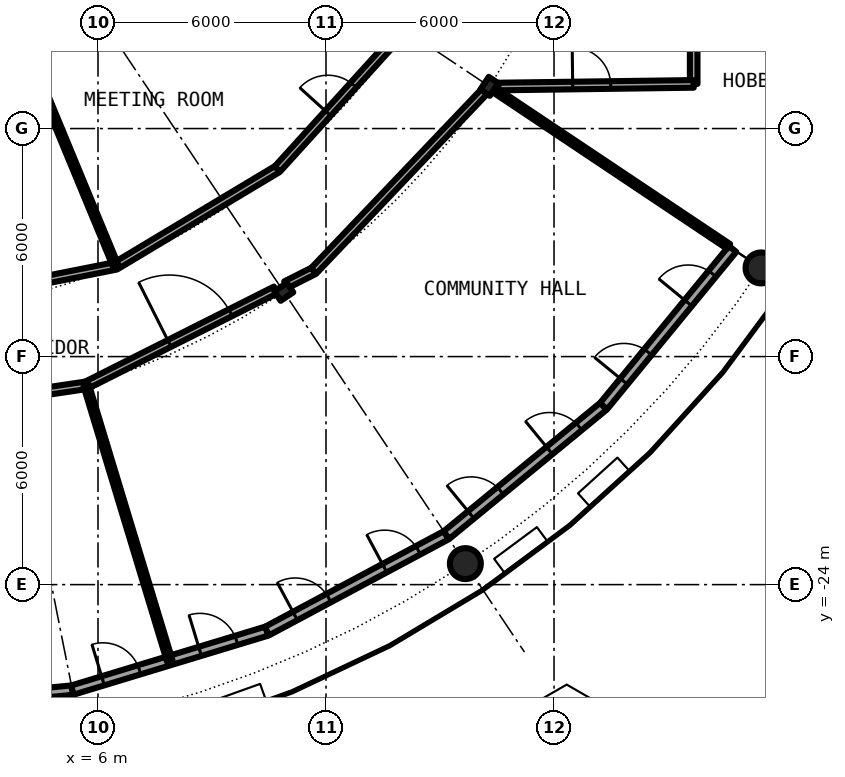
"""IFC4 building model, lengths in metres.
Left out: names, types, materials, properties, quantities, classifications, styles, units other than length and angle.
Written with IfcOpenShell. Run it as: python <this file> out.ifc"""

import sys

from ifc_helpers import new_model, si_unit, direction, frame, frame_2d, origin, origin_2d, place, context, subcontext, project, spatial, rectangle, hollow_circle, i_section, extrude, element, fill, save


model = new_model("IFC4")
c1 = context("Model", 3, precision=1e-05, world=origin(), true_north=direction((0.0, 1.0)))
c2 = subcontext(c1, "Body", "Model", "MODEL_VIEW")
j1 = project(units=[si_unit("LENGTHUNIT", "METRE"), si_unit("PLANEANGLEUNIT", "RADIAN")], contexts=[c1])
p1 = place(None, origin())
s1 = spatial("IfcSite", under=j1, at=p1, CompositionType="ELEMENT")
p2 = place(p1, origin())
s2 = spatial("IfcBuilding", under=s1, at=p2, CompositionType="ELEMENT")
p3 = place(p2, frame((0.0, 0.0, 208.5)))
s3 = spatial("IfcBuildingStorey", under=s2, at=p3, CompositionType="ELEMENT", Elevation=208.5)
for number, where, z_axis, x_axis in (
    (1, (15.667, -23.448, 0.0), (0.0, 0.0, 1.0), (1.0, 0.0, 0.0)),
    (2, (23.448, -15.667, 0.0), (0.0, 0.0, 1.0), (1.0, 0.0, 0.0)),
):
    element("IfcColumn", number, at=place(p3, frame(where, z_axis=z_axis, x_axis=x_axis)), inside=s3, PredefinedType="COLUMN", context=c2, shape_type="SweptSolid", body=[
        extrude(hollow_circle(Radius=0.406, WallThickness=0.03, at=origin_2d()), origin(), (0.0, 0.0, 1.0), 4.2),
    ])
for number, where, z_axis, x_axis in (
    (3, (10.889, -16.297, 0.0), (0.0, 0.0, 1.0), (0.556, -0.831, 0.0)),
    (4, (16.297, -10.889, 0.0), (0.0, 0.0, 1.0), (0.831, -0.556, 0.0)),
):
    element("IfcColumn", number, at=place(p3, frame(where, z_axis=z_axis, x_axis=x_axis)), inside=s3, PredefinedType="COLUMN", context=c2, shape_type="SweptSolid", body=[
        extrude(i_section(OverallWidth=0.3, OverallDepth=0.4, WebThickness=0.013, FlangeThickness=0.024, FilletRadius=0.027, at=origin_2d()), origin(), (0.0, 0.0, 1.0), 4.2),
    ])
p4 = place(p3, frame((0.0, -27.3, 0.0), z_axis=(0.0, 0.0, 1.0), x_axis=(0.995173996315, 0.098126026407, 0.0)))
e5 = element("IfcWall", 5, at=p4, inside=s3, PredefinedType="SOLIDWALL", context=c2, shape_type="SweptSolid", body=[
    extrude(rectangle(XDim=5.352, YDim=0.25, at=frame_2d((2.676, 0.0))), origin(), (0.0, 0.0, 1.0), 3.85),
])
p5 = place(p4, frame((0.841, 0.0, 0.0)))
e6 = element("IfcOpeningElement", 6, at=p5, cuts=e5, PredefinedType="OPENING", context=c2, shape_type="SweptSolid", body=[
    extrude(rectangle(XDim=1.0, YDim=2.2, at=frame_2d((0.5, 1.1))), frame((0.0, 0.135, 0.0), z_axis=(0.0, -1.0, 0.0), x_axis=(1.0, 0.0, 0.0)), (0.0, 0.0, 1.0), 0.27),
])
p6 = place(p4, frame((3.51, 0.0, 0.0)))
e7 = element("IfcOpeningElement", 7, at=p6, cuts=e5, PredefinedType="OPENING", context=c2, shape_type="SweptSolid", body=[
    extrude(rectangle(XDim=1.0, YDim=2.2, at=frame_2d((0.5, 1.1))), frame((0.0, 0.135, 0.0), z_axis=(0.0, -1.0, 0.0), x_axis=(1.0, 0.0, 0.0)), (0.0, 0.0, 1.0), 0.27),
])
p7 = place(p3, frame((5.326, -26.775, 0.0), z_axis=(0.0, 0.0, 1.0), x_axis=(0.956965678721, 0.290201119486, 0.0)))
e8 = element("IfcWall", 8, at=p7, inside=s3, PredefinedType="SOLIDWALL", context=c2, shape_type="SweptSolid", body=[
    extrude(rectangle(XDim=5.351, YDim=0.25, at=frame_2d((2.676, 0.0))), origin(), (0.0, 0.0, 1.0), 3.85),
])
p8 = place(p7, frame((0.841, 0.0, 0.0)))
e9 = element("IfcOpeningElement", 9, at=p8, cuts=e8, PredefinedType="OPENING", context=c2, shape_type="SweptSolid", body=[
    extrude(rectangle(XDim=1.0, YDim=2.2, at=frame_2d((0.5, 1.1))), frame((0.0, 0.135, 0.0), z_axis=(0.0, -1.0, 0.0), x_axis=(1.0, 0.0, 0.0)), (0.0, 0.0, 1.0), 0.27),
])
p9 = place(p7, frame((3.51, 0.0, 0.0)))
e10 = element("IfcOpeningElement", 10, at=p9, cuts=e8, PredefinedType="OPENING", context=c2, shape_type="SweptSolid", body=[
    extrude(rectangle(XDim=1.0, YDim=2.2, at=frame_2d((0.5, 1.1))), frame((0.0, 0.135, 0.0), z_axis=(0.0, -1.0, 0.0), x_axis=(1.0, 0.0, 0.0)), (0.0, 0.0, 1.0), 0.27),
])
p10 = place(p3, frame((10.447, -25.222, 0.0), z_axis=(0.0, 0.0, 1.0), x_axis=(0.881915646801, 0.471407246368, 0.0)))
e11 = element("IfcWall", 11, at=p10, inside=s3, PredefinedType="SOLIDWALL", context=c2, shape_type="SweptSolid", body=[
    extrude(rectangle(XDim=5.352, YDim=0.25, at=frame_2d((2.676, 0.0))), origin(), (0.0, 0.0, 1.0), 3.85),
])
p11 = place(p10, frame((0.841, 0.0, 0.0)))
e12 = element("IfcOpeningElement", 12, at=p11, cuts=e11, PredefinedType="OPENING", context=c2, shape_type="SweptSolid", body=[
    extrude(rectangle(XDim=1.0, YDim=2.2, at=frame_2d((0.5, 1.1))), frame((0.0, 0.135, 0.0), z_axis=(0.0, -1.0, 0.0), x_axis=(1.0, 0.0, 0.0)), (0.0, 0.0, 1.0), 0.27),
])
p12 = place(p10, frame((3.51, 0.0, 0.0)))
e13 = element("IfcOpeningElement", 13, at=p12, cuts=e11, PredefinedType="OPENING", context=c2, shape_type="SweptSolid", body=[
    extrude(rectangle(XDim=1.0, YDim=2.2, at=frame_2d((0.5, 1.1))), frame((0.0, 0.135, 0.0), z_axis=(0.0, -1.0, 0.0), x_axis=(1.0, 0.0, 0.0)), (0.0, 0.0, 1.0), 0.27),
])
p13 = place(p3, frame((15.167, -22.699, 0.0), z_axis=(0.0, 0.0, 1.0), x_axis=(0.773019449054, 0.634382322723, 0.0)))
e14 = element("IfcWall", 14, at=p13, inside=s3, PredefinedType="SOLIDWALL", context=c2, shape_type="SweptSolid", body=[
    extrude(rectangle(XDim=5.352, YDim=0.25, at=frame_2d((2.676, 0.0))), origin(), (0.0, 0.0, 1.0), 3.85),
])
p14 = place(p13, frame((0.841, 0.0, 0.0)))
e15 = element("IfcOpeningElement", 15, at=p14, cuts=e14, PredefinedType="OPENING", context=c2, shape_type="SweptSolid", body=[
    extrude(rectangle(XDim=1.0, YDim=2.2, at=frame_2d((0.5, 1.1))), frame((0.0, 0.135, 0.0), z_axis=(0.0, -1.0, 0.0), x_axis=(1.0, 0.0, 0.0)), (0.0, 0.0, 1.0), 0.27),
])
p15 = place(p13, frame((3.51, 0.0, 0.0)))
e16 = element("IfcOpeningElement", 16, at=p15, cuts=e14, PredefinedType="OPENING", context=c2, shape_type="SweptSolid", body=[
    extrude(rectangle(XDim=1.0, YDim=2.2, at=frame_2d((0.5, 1.1))), frame((0.0, 0.135, 0.0), z_axis=(0.0, -1.0, 0.0), x_axis=(1.0, 0.0, 0.0)), (0.0, 0.0, 1.0), 0.27),
])
p16 = place(p3, frame((19.304, -19.304, 0.0), z_axis=(0.0, 0.0, 1.0), x_axis=(0.634382322723, 0.773019449054, 0.0)))
e17 = element("IfcWall", 17, at=p16, inside=s3, PredefinedType="SOLIDWALL", context=c2, shape_type="SweptSolid", body=[
    extrude(rectangle(XDim=5.352, YDim=0.25, at=frame_2d((2.676, 0.0))), origin(), (0.0, 0.0, 1.0), 3.85),
])
p17 = place(p16, frame((0.841, 0.0, 0.0)))
e18 = element("IfcOpeningElement", 18, at=p17, cuts=e17, PredefinedType="OPENING", context=c2, shape_type="SweptSolid", body=[
    extrude(rectangle(XDim=1.0, YDim=2.2, at=frame_2d((0.5, 1.1))), frame((0.0, 0.135, 0.0), z_axis=(0.0, -1.0, 0.0), x_axis=(1.0, 0.0, 0.0)), (0.0, 0.0, 1.0), 0.27),
])
p18 = place(p16, frame((3.51, 0.0, 0.0)))
e19 = element("IfcOpeningElement", 19, at=p18, cuts=e17, PredefinedType="OPENING", context=c2, shape_type="SweptSolid", body=[
    extrude(rectangle(XDim=1.0, YDim=2.2, at=frame_2d((0.5, 1.1))), frame((0.0, 0.135, 0.0), z_axis=(0.0, -1.0, 0.0), x_axis=(1.0, 0.0, 0.0)), (0.0, 0.0, 1.0), 0.27),
])
p19 = place(p3, frame((21.675, -10.825, 0.0), z_axis=(0.0, 0.0, 1.0), x_axis=(0.0, 1.0, 0.0)))
e20 = element("IfcWall", 20, at=p19, inside=s3, PredefinedType="PARTITIONING", context=c2, shape_type="SweptSolid", body=[
    extrude(rectangle(XDim=1.775, YDim=0.2, at=frame_2d((0.887, 0.0))), origin(), (0.0, 0.0, 1.0), 3.85),
])
p20 = place(p3, frame((3.936, -19.016, 0.0), z_axis=(0.0, 0.0, 1.0), x_axis=(0.989189411235, 0.1466434748, 0.0)))
e21 = element("IfcWall", 21, at=p20, inside=s3, PredefinedType="PARTITIONING", context=c2, shape_type="SweptSolid", body=[
    extrude(rectangle(XDim=1.773, YDim=0.2, at=frame_2d((0.887, 0.0))), origin(), (0.0, 0.0, 1.0), 3.6),
])
p21 = place(p3, frame((5.69, -18.756, 0.0), z_axis=(0.0, 0.0, 1.0), x_axis=(0.893242938285, 0.449574302206, 0.0)))
e22 = element("IfcWall", 22, at=p21, inside=s3, PredefinedType="PARTITIONING", context=c2, shape_type="SweptSolid", body=[
    extrude(rectangle(XDim=5.581, YDim=0.2, at=frame_2d((2.791, 0.0))), origin(), (0.0, 0.0, 1.0), 3.6),
])
p22 = place(p21, frame((2.451, 0.0, 0.0)))
e23 = element("IfcOpeningElement", 23, at=p22, cuts=e22, PredefinedType="OPENING", context=c2, shape_type="SweptSolid", body=[
    extrude(rectangle(XDim=1.8, YDim=2.3, at=frame_2d((0.9, 1.15))), frame((0.0, 0.11, 0.0), z_axis=(0.0, -1.0, 0.0), x_axis=(1.0, 0.0, 0.0)), (0.0, 0.0, 1.0), 0.22),
])
p23 = place(p3, frame((10.945, -16.111, 0.0), z_axis=(0.0, 0.0, 1.0), x_axis=(0.893110817984, 0.449836711263, 0.0)))
e24 = element("IfcWall", 24, at=p23, inside=s3, PredefinedType="PARTITIONING", context=c2, shape_type="SweptSolid", body=[
    extrude(rectangle(XDim=0.818, YDim=0.2, at=frame_2d((0.409, 0.0))), origin(), (0.0, 0.0, 1.0), 3.85),
])
p24 = place(p3, frame((11.676, -15.743, 0.0), z_axis=(0.0, 0.0, 1.0), x_axis=(0.689484820725, 0.724300132535, 0.0)))
e25 = element("IfcWall", 25, at=p24, inside=s3, PredefinedType="PARTITIONING", context=c2, shape_type="SweptSolid", body=[
    extrude(rectangle(XDim=6.55, YDim=0.2, at=frame_2d((3.275, 0.0))), origin(), (0.0, 0.0, 1.0), 3.6),
])
p25 = place(p3, frame((6.467, -15.614, 0.0), z_axis=(0.0, 0.0, 1.0), x_axis=(0.857696997328, 0.514155483074, 0.0)))
e26 = element("IfcWall", 26, at=p25, inside=s3, PredefinedType="PARTITIONING", context=c2, shape_type="SweptSolid", body=[
    extrude(rectangle(XDim=4.96, YDim=0.2, at=frame_2d((2.48, 0.0))), origin(), (0.0, 0.0, 1.0), 3.85),
])
p26 = place(p3, frame((10.721, -13.064, 0.0), z_axis=(0.0, 0.0, 1.0), x_axis=(0.671634030197, 0.740883074095, 0.0)))
e27 = element("IfcWall", 27, at=p26, inside=s3, PredefinedType="PARTITIONING", context=c2, shape_type="SweptSolid", body=[
    extrude(rectangle(XDim=5.08, YDim=0.2, at=frame_2d((2.54, 0.0))), origin(), (0.0, 0.0, 1.0), 3.85),
])
p27 = place(p26, frame((1.98, 0.0, 0.0)))
e28 = element("IfcOpeningElement", 28, at=p27, cuts=e27, PredefinedType="OPENING", context=c2, shape_type="SweptSolid", body=[
    extrude(rectangle(XDim=1.0, YDim=2.3, at=frame_2d((0.5, 1.15))), frame((0.0, 0.11, 0.0), z_axis=(0.0, -1.0, 0.0), x_axis=(1.0, 0.0, 0.0)), (0.0, 0.0, 1.0), 0.22),
])
p28 = place(p3, frame((0.0, -16.9, 0.0), z_axis=(0.0, 0.0, 1.0), x_axis=(0.980799374359, 0.195019453537, 0.0)))
e29 = element("IfcWall", 29, at=p28, inside=s3, PredefinedType="PARTITIONING", context=c2, shape_type="SweptSolid", body=[
    extrude(rectangle(XDim=6.594, YDim=0.2, at=frame_2d((3.297, 0.0))), origin(), (0.0, 0.0, 1.0), 3.85),
])
p29 = place(p28, frame((2.797, 0.0, 0.0)))
e30 = element("IfcOpeningElement", 30, at=p29, cuts=e29, PredefinedType="OPENING", context=c2, shape_type="SweptSolid", body=[
    extrude(rectangle(XDim=1.0, YDim=2.3, at=frame_2d((0.5, 1.15))), frame((0.0, 0.11, 0.0), z_axis=(0.0, -1.0, 0.0), x_axis=(1.0, 0.0, 0.0)), (0.0, 0.0, 1.0), 0.22),
])
p30 = place(p3, frame((16.534, -10.894, 0.0), z_axis=(0.0, 0.0, 1.0), x_axis=(0.999909707888, 0.013437859594, 0.0)))
e31 = element("IfcWall", 31, at=p30, inside=s3, PredefinedType="PARTITIONING", context=c2, shape_type="SweptSolid", body=[
    extrude(rectangle(XDim=5.142, YDim=0.2, at=frame_2d((2.571, 0.0))), origin(), (0.0, 0.0, 1.0), 3.85),
])
p31 = place(p30, frame((1.958, 0.0, 0.0)))
e32 = element("IfcOpeningElement", 32, at=p31, cuts=e31, PredefinedType="OPENING", context=c2, shape_type="SweptSolid", body=[
    extrude(rectangle(XDim=1.0, YDim=2.3, at=frame_2d((0.5, 1.15))), frame((0.0, 0.11, 0.0), z_axis=(0.0, -1.0, 0.0), x_axis=(1.0, 0.0, 0.0)), (0.0, 0.0, 1.0), 0.22),
])
p32 = place(p3, frame((2.954, -7.132, 0.0), z_axis=(0.0, 0.0, 1.0), x_axis=(0.382646942224, -0.923894646378, 0.0)))
e33 = element("IfcWall", 33, at=p32, inside=s3, PredefinedType="PARTITIONING", context=c2, shape_type="SweptSolid", body=[
    extrude(rectangle(XDim=9.181, YDim=0.15, at=frame_2d((4.59, 0.0))), origin(), (0.0, 0.0, 1.0), 3.85),
])
p33 = place(p3, frame((5.69, -18.756, 0.0), z_axis=(0.0, 0.0, 1.0), x_axis=(0.29017646164, -0.956973155898, 0.0)))
e34 = element("IfcWall", 34, at=p33, inside=s3, PredefinedType="PARTITIONING", context=c2, shape_type="SweptSolid", body=[
    extrude(rectangle(XDim=7.575, YDim=0.15, at=frame_2d((3.787, 0.0))), origin(), (0.0, 0.0, 1.0), 3.85),
])
p34 = place(p3, frame((16.461, -11.003, 0.0), z_axis=(0.0, 0.0, 1.0), x_axis=(0.831418274402, -0.555647057933, 0.0)))
e35 = element("IfcWall", 35, at=p34, inside=s3, PredefinedType="PARTITIONING", context=c2, shape_type="SweptSolid", body=[
    extrude(rectangle(XDim=7.375, YDim=0.15, at=frame_2d((3.688, 0.0))), origin(), (0.0, 0.0, 1.0), 3.85),
])
p35 = place(p8, origin())
e36 = element("IfcDoor", 36, at=p35, inside=s3, OperationType="SINGLE_SWING_LEFT", PredefinedType="DOOR", context=c2, shape_type="SweptSolid", body=[
    extrude(rectangle(XDim=1.0, YDim=2.2, at=frame_2d((0.5, 1.1))), frame((0.0, 0.025, 0.0), z_axis=(0.0, -1.0, 0.0), x_axis=(1.0, 0.0, 0.0)), (0.0, 0.0, 1.0), 0.05),
])
fill(e9, e36)
p36 = place(p9, origin())
e37 = element("IfcDoor", 37, at=p36, inside=s3, OperationType="SINGLE_SWING_LEFT", PredefinedType="DOOR", context=c2, shape_type="SweptSolid", body=[
    extrude(rectangle(XDim=1.0, YDim=2.2, at=frame_2d((0.5, 1.1))), frame((0.0, 0.025, 0.0), z_axis=(0.0, -1.0, 0.0), x_axis=(1.0, 0.0, 0.0)), (0.0, 0.0, 1.0), 0.05),
])
fill(e10, e37)
p37 = place(p11, origin())
e38 = element("IfcDoor", 38, at=p37, inside=s3, OperationType="SINGLE_SWING_LEFT", PredefinedType="DOOR", context=c2, shape_type="SweptSolid", body=[
    extrude(rectangle(XDim=1.0, YDim=2.2, at=frame_2d((0.5, 1.1))), frame((0.0, 0.025, 0.0), z_axis=(0.0, -1.0, 0.0), x_axis=(1.0, 0.0, 0.0)), (0.0, 0.0, 1.0), 0.05),
])
fill(e12, e38)
p38 = place(p12, origin())
e39 = element("IfcDoor", 39, at=p38, inside=s3, OperationType="SINGLE_SWING_LEFT", PredefinedType="DOOR", context=c2, shape_type="SweptSolid", body=[
    extrude(rectangle(XDim=1.0, YDim=2.2, at=frame_2d((0.5, 1.1))), frame((0.0, 0.025, 0.0), z_axis=(0.0, -1.0, 0.0), x_axis=(1.0, 0.0, 0.0)), (0.0, 0.0, 1.0), 0.05),
])
fill(e13, e39)
p39 = place(p14, origin())
e40 = element("IfcDoor", 40, at=p39, inside=s3, OperationType="SINGLE_SWING_LEFT", PredefinedType="DOOR", context=c2, shape_type="SweptSolid", body=[
    extrude(rectangle(XDim=1.0, YDim=2.2, at=frame_2d((0.5, 1.1))), frame((0.0, 0.025, 0.0), z_axis=(0.0, -1.0, 0.0), x_axis=(1.0, 0.0, 0.0)), (0.0, 0.0, 1.0), 0.05),
])
fill(e15, e40)
p40 = place(p15, origin())
e41 = element("IfcDoor", 41, at=p40, inside=s3, OperationType="SINGLE_SWING_LEFT", PredefinedType="DOOR", context=c2, shape_type="SweptSolid", body=[
    extrude(rectangle(XDim=1.0, YDim=2.2, at=frame_2d((0.5, 1.1))), frame((0.0, 0.025, 0.0), z_axis=(0.0, -1.0, 0.0), x_axis=(1.0, 0.0, 0.0)), (0.0, 0.0, 1.0), 0.05),
])
fill(e16, e41)
p41 = place(p17, origin())
e42 = element("IfcDoor", 42, at=p41, inside=s3, OperationType="SINGLE_SWING_LEFT", PredefinedType="DOOR", context=c2, shape_type="SweptSolid", body=[
    extrude(rectangle(XDim=1.0, YDim=2.2, at=frame_2d((0.5, 1.1))), frame((0.0, 0.025, 0.0), z_axis=(0.0, -1.0, 0.0), x_axis=(1.0, 0.0, 0.0)), (0.0, 0.0, 1.0), 0.05),
])
fill(e18, e42)
p42 = place(p18, origin())
e43 = element("IfcDoor", 43, at=p42, inside=s3, OperationType="SINGLE_SWING_LEFT", PredefinedType="DOOR", context=c2, shape_type="SweptSolid", body=[
    extrude(rectangle(XDim=1.0, YDim=2.2, at=frame_2d((0.5, 1.1))), frame((0.0, 0.025, 0.0), z_axis=(0.0, -1.0, 0.0), x_axis=(1.0, 0.0, 0.0)), (0.0, 0.0, 1.0), 0.05),
])
fill(e19, e43)
p43 = place(p22, origin())
e44 = element("IfcDoor", 44, at=p43, inside=s3, OperationType="DOUBLE_DOOR_SINGLE_SWING", PredefinedType="DOOR", context=c2, shape_type="SweptSolid", body=[
    extrude(rectangle(XDim=1.8, YDim=2.3, at=frame_2d((0.9, 1.15))), frame((0.0, 0.025, 0.0), z_axis=(0.0, -1.0, 0.0), x_axis=(1.0, 0.0, 0.0)), (0.0, 0.0, 1.0), 0.05),
])
fill(e23, e44)
p44 = place(p27, origin())
e45 = element("IfcDoor", 45, at=p44, inside=s3, OperationType="SINGLE_SWING_RIGHT", PredefinedType="DOOR", context=c2, shape_type="SweptSolid", body=[
    extrude(rectangle(XDim=1.0, YDim=2.3, at=frame_2d((0.5, 1.15))), frame((0.0, 0.025, 0.0), z_axis=(0.0, -1.0, 0.0), x_axis=(1.0, 0.0, 0.0)), (0.0, 0.0, 1.0), 0.05),
])
fill(e28, e45)
p45 = place(p31, origin())
e46 = element("IfcDoor", 46, at=p45, inside=s3, OperationType="SINGLE_SWING_LEFT", PredefinedType="DOOR", context=c2, shape_type="SweptSolid", body=[
    extrude(rectangle(XDim=1.0, YDim=2.3, at=frame_2d((0.5, 1.15))), frame((0.0, 0.025, 0.0), z_axis=(0.0, -1.0, 0.0), x_axis=(1.0, 0.0, 0.0)), (0.0, 0.0, 1.0), 0.05),
])
fill(e32, e46)
save(model, sys.argv[1])
